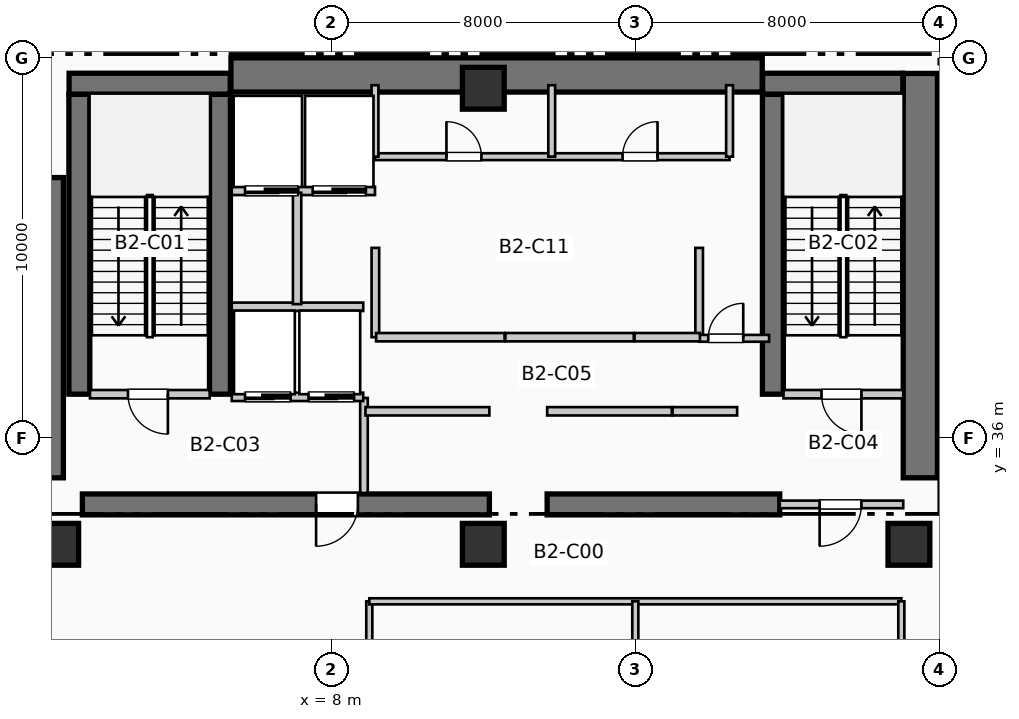
"""IFC4 building model, lengths in metres.
Left out: names, types, materials, properties, quantities, classifications, styles, units other than length and angle.
Written with IfcOpenShell. Run it as: python <this file> out.ifc"""

import sys

from ifc_helpers import new_model, si_unit, direction, frame, frame_2d, origin, origin_2d, place, context, subcontext, project, spatial, rectangle, extrude, element, fill, save


model = new_model("IFC4")
c1 = context("Model", 3, precision=1e-05, world=origin(), true_north=direction((0.0, 1.0)))
c2 = subcontext(c1, "Body", "Model", "MODEL_VIEW")
j1 = project(units=[si_unit("LENGTHUNIT", "METRE"), si_unit("PLANEANGLEUNIT", "RADIAN")], contexts=[c1])
p1 = place(None, origin())
s1 = spatial("IfcSite", under=j1, at=p1, CompositionType="ELEMENT")
p2 = place(p1, origin())
s2 = spatial("IfcBuilding", under=s1, at=p2, CompositionType="ELEMENT")
p3 = place(p2, frame((0.0, 0.0, -9.24)))
s3 = spatial("IfcBuildingStorey", under=s2, at=p3, CompositionType="ELEMENT", Elevation=-9.24)
p4 = place(p3, frame((5.36, 45.55, 0.0), z_axis=(0.0, 0.0, 1.0), x_axis=(1.0, 0.0, 0.0)))
e1 = element("IfcWall", 1, at=p4, inside=s3, PredefinedType="SHEAR", context=c2, shape_type="SweptSolid", body=[
    extrude(rectangle(XDim=13.98, YDim=0.9, at=frame_2d((6.99, 0.0))), origin(), (0.0, 0.0, 1.0), 4.62),
])
p5 = place(p3, frame((0.5, 34.95, 0.0), z_axis=(0.0, 0.0, 1.0), x_axis=(0.0, 1.0, 0.0)))
e2 = element("IfcWall", 2, at=p5, inside=s3, PredefinedType="SHEAR", context=c2, shape_type="SweptSolid", body=[
    extrude(rectangle(XDim=7.9, YDim=0.9, at=frame_2d((3.95, 0.0))), origin(), (0.0, 0.0, 1.0), 4.62),
])
p6 = place(p3, frame((23.5, 34.95, 0.0), z_axis=(0.0, 0.0, 1.0), x_axis=(0.0, 1.0, 0.0)))
e3 = element("IfcWall", 3, at=p6, inside=s3, PredefinedType="SHEAR", context=c2, shape_type="SweptSolid", body=[
    extrude(rectangle(XDim=10.64, YDim=0.9, at=frame_2d((5.32, 0.0))), origin(), (0.0, 0.0, 1.0), 4.62),
])
p7 = place(p3, frame((1.45, 34.25, 0.0), z_axis=(0.0, 0.0, 1.0), x_axis=(1.0, 0.0, 0.0)))
e4 = element("IfcWall", 4, at=p7, inside=s3, PredefinedType="SHEAR", context=c2, shape_type="SweptSolid", body=[
    extrude(rectangle(XDim=10.71, YDim=0.55, at=frame_2d((5.355, 0.0))), origin(), (0.0, 0.0, 1.0), 4.62),
])
p8 = place(p7, frame((7.25, 0.0, 0.0), z_axis=(0.0, 0.0, 1.0), x_axis=(-1.0, 0.0, 0.0)))
e5 = element("IfcOpeningElement", 5, at=p8, cuts=e4, PredefinedType="OPENING", context=c2, shape_type="SweptSolid", body=[
    extrude(rectangle(XDim=1.1, YDim=2.15, at=frame_2d((0.55, 1.075))), frame((0.0, 0.285, 0.0), z_axis=(0.0, -1.0, 0.0), x_axis=(1.0, 0.0, 0.0)), (0.0, 0.0, 1.0), 0.57),
])
p9 = place(p3, frame((13.68, 34.25, 0.0), z_axis=(0.0, 0.0, 1.0), x_axis=(1.0, 0.0, 0.0)))
e6 = element("IfcWall", 6, at=p9, inside=s3, PredefinedType="SHEAR", context=c2, shape_type="SweptSolid", body=[
    extrude(rectangle(XDim=6.12, YDim=0.55, at=frame_2d((3.06, 0.0))), origin(), (0.0, 0.0, 1.0), 4.62),
])
for number, where, z_axis, x_axis in (
    (7, (1.37, 37.15, 0.0), (0.0, 0.0, 1.0), (0.0, 1.0, 0.0)),
    (8, (5.07, 37.15, 0.0), (0.0, 0.0, 1.0), (0.0, 1.0, 0.0)),
):
    element("IfcWall", number, at=place(p3, frame(where, z_axis=z_axis, x_axis=x_axis)), inside=s3, PredefinedType="SHEAR", context=c2, shape_type="SweptSolid", body=[
        extrude(rectangle(XDim=7.89, YDim=0.55, at=frame_2d((3.945, 0.0))), origin(), (0.0, 0.0, 1.0), 4.62),
    ])
p10 = place(p3, frame((1.1, 45.32, 0.0), z_axis=(0.0, 0.0, 1.0), x_axis=(1.0, 0.0, 0.0)))
e9 = element("IfcWall", 9, at=p10, inside=s3, PredefinedType="SHEAR", context=c2, shape_type="SweptSolid", body=[
    extrude(rectangle(XDim=4.24, YDim=0.55, at=frame_2d((2.12, 0.0))), origin(), (0.0, 0.0, 1.0), 4.62),
])
p11 = place(p3, frame((19.62, 37.15, 0.0), z_axis=(0.0, 0.0, 1.0), x_axis=(0.0, 1.0, 0.0)))
e10 = element("IfcWall", 10, at=p11, inside=s3, PredefinedType="SHEAR", context=c2, shape_type="SweptSolid", body=[
    extrude(rectangle(XDim=7.89, YDim=0.55, at=frame_2d((3.945, 0.0))), origin(), (0.0, 0.0, 1.0), 4.62),
])
p12 = place(p3, frame((19.35, 45.32, 0.0), z_axis=(0.0, 0.0, 1.0), x_axis=(1.0, 0.0, 0.0)))
e11 = element("IfcWall", 11, at=p12, inside=s3, PredefinedType="SHEAR", context=c2, shape_type="SweptSolid", body=[
    extrude(rectangle(XDim=3.69, YDim=0.55, at=frame_2d((1.845, 0.0))), origin(), (0.0, 0.0, 1.0), 4.62),
])
for number, where, z_axis, x_axis in (
    (12, (0.8, 33.2, 0.0), (0.0, 0.0, 1.0), (1.0, 0.0, 0.0)),
    (13, (12.0, 33.2, 0.0), (0.0, 0.0, 1.0), (1.0, 0.0, 0.0)),
    (14, (12.0, 45.2, 0.0), (0.0, 0.0, 1.0), (1.0, 0.0, 0.0)),
    (15, (23.2, 33.2, 0.0), (0.0, 0.0, 1.0), (1.0, 0.0, 0.0)),
):
    element("IfcColumn", number, at=place(p3, frame(where, z_axis=z_axis, x_axis=x_axis)), inside=s3, PredefinedType="COLUMN", context=c2, shape_type="SweptSolid", body=[
        extrude(rectangle(XDim=1.1, YDim=1.1, at=origin_2d()), origin(), (0.0, 0.0, 1.0), 4.62),
    ])
p13 = place(p3, frame((1.65, 37.15, 0.0), z_axis=(0.0, 0.0, 1.0), x_axis=(1.0, 0.0, 0.0)))
e16 = element("IfcWall", 16, at=p13, inside=s3, PredefinedType="PARTITIONING", context=c2, shape_type="SweptSolid", body=[
    extrude(rectangle(XDim=3.15, YDim=0.22, at=frame_2d((1.575, 0.0))), origin(), (0.0, 0.0, 1.0), 4.27),
])
p14 = place(p13, frame((2.05, 0.0, 0.0), z_axis=(0.0, 0.0, 1.0), x_axis=(-1.0, 0.0, 0.0)))
e17 = element("IfcOpeningElement", 17, at=p14, cuts=e16, PredefinedType="OPENING", context=c2, shape_type="SweptSolid", body=[
    extrude(rectangle(XDim=1.05, YDim=2.15, at=frame_2d((0.525, 1.075))), frame((0.0, 0.12, 0.0), z_axis=(0.0, -1.0, 0.0), x_axis=(1.0, 0.0, 0.0)), (0.0, 0.0, 1.0), 0.24),
])
p15 = place(p3, frame((8.86, 34.55, 0.0), z_axis=(0.0, 0.0, 1.0), x_axis=(0.0, 1.0, 0.0)))
e18 = element("IfcWall", 18, at=p15, inside=s3, PredefinedType="PARTITIONING", context=c2, shape_type="SweptSolid", body=[
    extrude(rectangle(XDim=2.5, YDim=0.2, at=frame_2d((1.25, 0.0))), origin(), (0.0, 0.0, 1.0), 4.27),
])
p16 = place(p3, frame((19.9, 37.15, 0.0), z_axis=(0.0, 0.0, 1.0), x_axis=(1.0, 0.0, 0.0)))
e19 = element("IfcWall", 19, at=p16, inside=s3, PredefinedType="PARTITIONING", context=c2, shape_type="SweptSolid", body=[
    extrude(rectangle(XDim=3.15, YDim=0.22, at=frame_2d((1.575, 0.0))), origin(), (0.0, 0.0, 1.0), 4.27),
])
p17 = place(p16, frame((2.05, 0.0, 0.0), z_axis=(0.0, 0.0, 1.0), x_axis=(-1.0, 0.0, 0.0)))
e20 = element("IfcOpeningElement", 20, at=p17, cuts=e19, PredefinedType="OPENING", context=c2, shape_type="SweptSolid", body=[
    extrude(rectangle(XDim=1.05, YDim=2.15, at=frame_2d((0.525, 1.075))), frame((0.0, 0.12, 0.0), z_axis=(0.0, -1.0, 0.0), x_axis=(1.0, 0.0, 0.0)), (0.0, 0.0, 1.0), 0.24),
])
p18 = place(p3, frame((19.8, 34.25, 0.0), z_axis=(0.0, 0.0, 1.0), x_axis=(1.0, 0.0, 0.0)))
e21 = element("IfcWall", 21, at=p18, inside=s3, PredefinedType="PARTITIONING", context=c2, shape_type="SweptSolid", body=[
    extrude(rectangle(XDim=3.25, YDim=0.2, at=frame_2d((1.625, 0.0))), origin(), (0.0, 0.0, 1.0), 4.27),
])
p19 = place(p18, frame((2.15, 0.0, 0.0), z_axis=(0.0, 0.0, 1.0), x_axis=(-1.0, 0.0, 0.0)))
e22 = element("IfcOpeningElement", 22, at=p19, cuts=e21, PredefinedType="OPENING", context=c2, shape_type="SweptSolid", body=[
    extrude(rectangle(XDim=1.1, YDim=2.15, at=frame_2d((0.55, 1.075))), frame((0.0, 0.11, 0.0), z_axis=(0.0, -1.0, 0.0), x_axis=(1.0, 0.0, 0.0)), (0.0, 0.0, 1.0), 0.22),
])
p20 = place(p3, frame((5.38, 37.08, 0.0), z_axis=(0.0, 0.0, 1.0), x_axis=(1.0, 0.0, 0.0)))
e23 = element("IfcWall", 23, at=p20, inside=s3, PredefinedType="PARTITIONING", context=c2, shape_type="SweptSolid", body=[
    extrude(rectangle(XDim=3.46, YDim=0.22, at=frame_2d((1.73, 0.0))), origin(), (0.0, 0.0, 1.0), 4.27),
])
p21 = place(p20, frame((1.55, 0.0, 0.0), z_axis=(0.0, 0.0, 1.0), x_axis=(-1.0, 0.0, 0.0)))
e24 = element("IfcOpeningElement", 24, at=p21, cuts=e23, PredefinedType="OPENING", context=c2, shape_type="SweptSolid", body=[
    extrude(rectangle(XDim=1.2, YDim=2.2, at=frame_2d((0.6, 1.1))), frame((0.0, 0.12, 0.0), z_axis=(0.0, -1.0, 0.0), x_axis=(1.0, 0.0, 0.0)), (0.0, 0.0, 1.0), 0.24),
])
p22 = place(p20, frame((3.22, 0.0, 0.0), z_axis=(0.0, 0.0, 1.0), x_axis=(-1.0, 0.0, 0.0)))
e25 = element("IfcOpeningElement", 25, at=p22, cuts=e23, PredefinedType="OPENING", context=c2, shape_type="SweptSolid", body=[
    extrude(rectangle(XDim=1.2, YDim=2.2, at=frame_2d((0.6, 1.1))), frame((0.0, 0.12, 0.0), z_axis=(0.0, -1.0, 0.0), x_axis=(1.0, 0.0, 0.0)), (0.0, 0.0, 1.0), 0.24),
])
p23 = place(p3, frame((5.38, 39.45, 0.0), z_axis=(0.0, 0.0, 1.0), x_axis=(1.0, 0.0, 0.0)))
e26 = element("IfcWall", 26, at=p23, inside=s3, PredefinedType="PARTITIONING", context=c2, shape_type="SweptSolid", body=[
    extrude(rectangle(XDim=3.46, YDim=0.22, at=frame_2d((1.73, 0.0))), origin(), (0.0, 0.0, 1.0), 4.27),
])
p24 = place(p3, frame((5.38, 42.5, 0.0), z_axis=(0.0, 0.0, 1.0), x_axis=(1.0, 0.0, 0.0)))
e27 = element("IfcWall", 27, at=p24, inside=s3, PredefinedType="PARTITIONING", context=c2, shape_type="SweptSolid", body=[
    extrude(rectangle(XDim=3.77, YDim=0.22, at=frame_2d((1.885, 0.0))), origin(), (0.0, 0.0, 1.0), 4.27),
])
p25 = place(p24, frame((1.75, 0.0, 0.0), z_axis=(0.0, 0.0, 1.0), x_axis=(-1.0, 0.0, 0.0)))
e28 = element("IfcOpeningElement", 28, at=p25, cuts=e27, PredefinedType="OPENING", context=c2, shape_type="SweptSolid", body=[
    extrude(rectangle(XDim=1.4, YDim=2.2, at=frame_2d((0.7, 1.1))), frame((0.0, 0.12, 0.0), z_axis=(0.0, -1.0, 0.0), x_axis=(1.0, 0.0, 0.0)), (0.0, 0.0, 1.0), 0.24),
])
p26 = place(p24, frame((3.53, 0.0, 0.0), z_axis=(0.0, 0.0, 1.0), x_axis=(-1.0, 0.0, 0.0)))
e29 = element("IfcOpeningElement", 29, at=p26, cuts=e27, PredefinedType="OPENING", context=c2, shape_type="SweptSolid", body=[
    extrude(rectangle(XDim=1.4, YDim=2.2, at=frame_2d((0.7, 1.1))), frame((0.0, 0.12, 0.0), z_axis=(0.0, -1.0, 0.0), x_axis=(1.0, 0.0, 0.0)), (0.0, 0.0, 1.0), 0.24),
])
p27 = place(p3, frame((7.1, 39.52, 0.0), z_axis=(0.0, 0.0, 1.0), x_axis=(0.0, 1.0, 0.0)))
e30 = element("IfcWall", 30, at=p27, inside=s3, PredefinedType="PARTITIONING", context=c2, shape_type="SweptSolid", body=[
    extrude(rectangle(XDim=2.93, YDim=0.22, at=frame_2d((1.465, 0.0))), origin(), (0.0, 0.0, 1.0), 4.27),
])
for number, where, z_axis, x_axis in (
    (31, (9.16, 38.65, 0.0), (0.0, 0.0, 1.0), (0.0, 1.0, 0.0)),
    (32, (17.68, 38.65, 0.0), (0.0, 0.0, 1.0), (0.0, 1.0, 0.0)),
):
    element("IfcWall", number, at=place(p3, frame(where, z_axis=z_axis, x_axis=x_axis)), inside=s3, PredefinedType="PARTITIONING", context=c2, shape_type="SweptSolid", body=[
        extrude(rectangle(XDim=2.35, YDim=0.2, at=frame_2d((1.175, 0.0))), origin(), (0.0, 0.0, 1.0), 4.27),
    ])
p28 = place(p3, frame((17.68, 38.62, 0.0), z_axis=(0.0, 0.0, 1.0), x_axis=(1.0, 0.0, 0.0)))
e33 = element("IfcWall", 33, at=p28, inside=s3, PredefinedType="PARTITIONING", context=c2, shape_type="SweptSolid", body=[
    extrude(rectangle(XDim=1.84, YDim=0.18, at=frame_2d((0.92, 0.0))), origin(), (0.0, 0.0, 1.0), 4.27),
])
p29 = place(p28, frame((0.24, 0.0, 0.0)))
e34 = element("IfcOpeningElement", 34, at=p29, cuts=e33, PredefinedType="OPENING", context=c2, shape_type="SweptSolid", body=[
    extrude(rectangle(XDim=0.92, YDim=2.1, at=frame_2d((0.46, 1.05))), frame((0.0, 0.1, 0.0), z_axis=(0.0, -1.0, 0.0), x_axis=(1.0, 0.0, 0.0)), (0.0, 0.0, 1.0), 0.2),
])
p30 = place(p3, frame((8.9, 36.7, 0.0), z_axis=(0.0, 0.0, 1.0), x_axis=(1.0, 0.0, 0.0)))
e35 = element("IfcWall", 35, at=p30, inside=s3, PredefinedType="PARTITIONING", context=c2, shape_type="SweptSolid", body=[
    extrude(rectangle(XDim=3.26, YDim=0.22, at=frame_2d((1.63, 0.0))), origin(), (0.0, 0.0, 1.0), 4.27),
])
p31 = place(p3, frame((9.18, 38.65, 0.0), z_axis=(0.0, 0.0, 1.0), x_axis=(1.0, 0.0, 0.0)))
e36 = element("IfcWall", 36, at=p31, inside=s3, PredefinedType="PARTITIONING", context=c2, shape_type="SweptSolid", body=[
    extrude(rectangle(XDim=3.38, YDim=0.22, at=frame_2d((1.69, 0.0))), origin(), (0.0, 0.0, 1.0), 4.27),
])
p32 = place(p3, frame((13.68, 36.7, 0.0), z_axis=(0.0, 0.0, 1.0), x_axis=(1.0, 0.0, 0.0)))
e37 = element("IfcWall", 37, at=p32, inside=s3, PredefinedType="PARTITIONING", context=c2, shape_type="SweptSolid", body=[
    extrude(rectangle(XDim=3.28, YDim=0.22, at=frame_2d((1.64, 0.0))), origin(), (0.0, 0.0, 1.0), 4.27),
])
p33 = place(p3, frame((12.58, 38.65, 0.0), z_axis=(0.0, 0.0, 1.0), x_axis=(1.0, 0.0, 0.0)))
e38 = element("IfcWall", 38, at=p33, inside=s3, PredefinedType="PARTITIONING", context=c2, shape_type="SweptSolid", body=[
    extrude(rectangle(XDim=3.38, YDim=0.22, at=frame_2d((1.69, 0.0))), origin(), (0.0, 0.0, 1.0), 4.27),
])
p34 = place(p3, frame((16.98, 36.7, 0.0), z_axis=(0.0, 0.0, 1.0), x_axis=(1.0, 0.0, 0.0)))
e39 = element("IfcWall", 39, at=p34, inside=s3, PredefinedType="PARTITIONING", context=c2, shape_type="SweptSolid", body=[
    extrude(rectangle(XDim=1.7, YDim=0.22, at=frame_2d((0.85, 0.0))), origin(), (0.0, 0.0, 1.0), 4.27),
])
p35 = place(p3, frame((15.98, 38.65, 0.0), z_axis=(0.0, 0.0, 1.0), x_axis=(1.0, 0.0, 0.0)))
e40 = element("IfcWall", 40, at=p35, inside=s3, PredefinedType="PARTITIONING", context=c2, shape_type="SweptSolid", body=[
    extrude(rectangle(XDim=1.72, YDim=0.22, at=frame_2d((0.86, 0.0))), origin(), (0.0, 0.0, 1.0), 4.27),
])
p36 = place(p3, frame((9.15, 43.4, 0.0), z_axis=(0.0, 0.0, 1.0), x_axis=(1.0, 0.0, 0.0)))
e41 = element("IfcWall", 41, at=p36, inside=s3, PredefinedType="PLUMBINGWALL", context=c2, shape_type="SweptSolid", body=[
    extrude(rectangle(XDim=9.33, YDim=0.18, at=frame_2d((4.665, 0.0))), origin(), (0.0, 0.0, 1.0), 4.27),
])
p37 = place(p36, frame((1.88, 0.0, 0.0)))
e42 = element("IfcOpeningElement", 42, at=p37, cuts=e41, PredefinedType="OPENING", context=c2, shape_type="SweptSolid", body=[
    extrude(rectangle(XDim=0.92, YDim=2.1, at=frame_2d((0.46, 1.05))), frame((0.0, 0.1, 0.0), z_axis=(0.0, -1.0, 0.0), x_axis=(1.0, 0.0, 0.0)), (0.0, 0.0, 1.0), 0.2),
])
p38 = place(p36, frame((6.515, 0.0, 0.0)))
e43 = element("IfcOpeningElement", 43, at=p38, cuts=e41, PredefinedType="OPENING", context=c2, shape_type="SweptSolid", body=[
    extrude(rectangle(XDim=0.92, YDim=2.1, at=frame_2d((0.46, 1.05))), frame((0.0, 0.1, 0.0), z_axis=(0.0, -1.0, 0.0), x_axis=(1.0, 0.0, 0.0)), (0.0, 0.0, 1.0), 0.2),
])
for number, where, z_axis, x_axis in (
    (44, (9.15, 43.4, 0.0), (0.0, 0.0, 1.0), (0.0, 1.0, 0.0)),
    (45, (18.48, 43.4, 0.0), (0.0, 0.0, 1.0), (0.0, 1.0, 0.0)),
    (46, (13.8, 43.4, 0.0), (0.0, 0.0, 1.0), (0.0, 1.0, 0.0)),
):
    element("IfcWall", number, at=place(p3, frame(where, z_axis=z_axis, x_axis=x_axis)), inside=s3, PredefinedType="PLUMBINGWALL", context=c2, shape_type="SweptSolid", body=[
        extrude(rectangle(XDim=1.88, YDim=0.18, at=frame_2d((0.94, 0.0))), origin(), (0.0, 0.0, 1.0), 4.27),
    ])
p39 = place(p3, frame((9.0, 26.2, 0.0), z_axis=(0.0, 0.0, 1.0), x_axis=(0.0, 1.0, 0.0)))
e47 = element("IfcWall", 47, at=p39, inside=s3, PredefinedType="PARTITIONING", context=c2, shape_type="SweptSolid", body=[
    extrude(rectangle(XDim=5.5, YDim=0.16, at=frame_2d((2.75, 0.0))), origin(), (0.0, 0.0, 1.0), 4.27),
])
p40 = place(p3, frame((9.0, 31.7, 0.0), z_axis=(0.0, 0.0, 1.0), x_axis=(1.0, 0.0, 0.0)))
e48 = element("IfcWall", 48, at=p40, inside=s3, PredefinedType="PARTITIONING", context=c2, shape_type="SweptSolid", body=[
    extrude(rectangle(XDim=14.0, YDim=0.16, at=frame_2d((7.0, 0.0))), origin(), (0.0, 0.0, 1.0), 4.27),
])
p41 = place(p3, frame((23.0, 26.2, 0.0), z_axis=(0.0, 0.0, 1.0), x_axis=(0.0, 1.0, 0.0)))
e49 = element("IfcWall", 49, at=p41, inside=s3, PredefinedType="PARTITIONING", context=c2, shape_type="SweptSolid", body=[
    extrude(rectangle(XDim=5.5, YDim=0.16, at=frame_2d((2.75, 0.0))), origin(), (0.0, 0.0, 1.0), 3.455),
])
p42 = place(p3, frame((16.0, 26.2, 0.0), z_axis=(0.0, 0.0, 1.0), x_axis=(0.0, 1.0, 0.0)))
e50 = element("IfcWall", 50, at=p42, inside=s3, PredefinedType="PARTITIONING", context=c2, shape_type="SweptSolid", body=[
    extrude(rectangle(XDim=5.5, YDim=0.16, at=frame_2d((2.75, 0.0))), origin(), (0.0, 0.0, 1.0), 4.27),
])
p43 = place(p14, origin())
e51 = element("IfcDoor", 51, at=p43, inside=s3, OperationType="SINGLE_SWING_RIGHT", PredefinedType="DOOR", context=c2, shape_type="SweptSolid", body=[
    extrude(rectangle(XDim=1.05, YDim=2.15, at=frame_2d((0.525, 1.075))), frame((0.0, 0.025, 0.0), z_axis=(0.0, -1.0, 0.0), x_axis=(1.0, 0.0, 0.0)), (0.0, 0.0, 1.0), 0.05),
])
fill(e17, e51)
p44 = place(p8, origin())
e52 = element("IfcDoor", 52, at=p44, inside=s3, OperationType="SINGLE_SWING_LEFT", PredefinedType="DOOR", context=c2, shape_type="SweptSolid", body=[
    extrude(rectangle(XDim=1.1, YDim=2.15, at=frame_2d((0.55, 1.075))), frame((0.0, 0.025, 0.0), z_axis=(0.0, -1.0, 0.0), x_axis=(1.0, 0.0, 0.0)), (0.0, 0.0, 1.0), 0.05),
])
fill(e5, e52)
p45 = place(p17, origin())
e53 = element("IfcDoor", 53, at=p45, inside=s3, OperationType="SINGLE_SWING_RIGHT", PredefinedType="DOOR", context=c2, shape_type="SweptSolid", body=[
    extrude(rectangle(XDim=1.05, YDim=2.15, at=frame_2d((0.525, 1.075))), frame((0.0, 0.025, 0.0), z_axis=(0.0, -1.0, 0.0), x_axis=(1.0, 0.0, 0.0)), (0.0, 0.0, 1.0), 0.05),
])
fill(e20, e53)
p46 = place(p19, origin())
e54 = element("IfcDoor", 54, at=p46, inside=s3, OperationType="SINGLE_SWING_LEFT", PredefinedType="DOOR", context=c2, shape_type="SweptSolid", body=[
    extrude(rectangle(XDim=1.1, YDim=2.15, at=frame_2d((0.55, 1.075))), frame((0.0, 0.025, 0.0), z_axis=(0.0, -1.0, 0.0), x_axis=(1.0, 0.0, 0.0)), (0.0, 0.0, 1.0), 0.05),
])
fill(e22, e54)
p47 = place(p21, origin())
e55 = element("IfcDoor", 55, at=p47, inside=s3, OperationType="SLIDING_TO_RIGHT", PredefinedType="DOOR", context=c2, shape_type="SweptSolid", body=[
    extrude(rectangle(XDim=1.2, YDim=2.2, at=frame_2d((0.6, 1.1))), frame((0.0, 0.025, 0.0), z_axis=(0.0, -1.0, 0.0), x_axis=(1.0, 0.0, 0.0)), (0.0, 0.0, 1.0), 0.05),
])
fill(e24, e55)
p48 = place(p22, origin())
e56 = element("IfcDoor", 56, at=p48, inside=s3, OperationType="SLIDING_TO_RIGHT", PredefinedType="DOOR", context=c2, shape_type="SweptSolid", body=[
    extrude(rectangle(XDim=1.2, YDim=2.2, at=frame_2d((0.6, 1.1))), frame((0.0, 0.025, 0.0), z_axis=(0.0, -1.0, 0.0), x_axis=(1.0, 0.0, 0.0)), (0.0, 0.0, 1.0), 0.05),
])
fill(e25, e56)
p49 = place(p25, origin())
e57 = element("IfcDoor", 57, at=p49, inside=s3, OperationType="SLIDING_TO_LEFT", PredefinedType="DOOR", context=c2, shape_type="SweptSolid", body=[
    extrude(rectangle(XDim=1.4, YDim=2.2, at=frame_2d((0.7, 1.1))), frame((0.0, 0.025, 0.0), z_axis=(0.0, -1.0, 0.0), x_axis=(1.0, 0.0, 0.0)), (0.0, 0.0, 1.0), 0.05),
])
fill(e28, e57)
p50 = place(p26, origin())
e58 = element("IfcDoor", 58, at=p50, inside=s3, OperationType="SLIDING_TO_LEFT", PredefinedType="DOOR", context=c2, shape_type="SweptSolid", body=[
    extrude(rectangle(XDim=1.4, YDim=2.2, at=frame_2d((0.7, 1.1))), frame((0.0, 0.025, 0.0), z_axis=(0.0, -1.0, 0.0), x_axis=(1.0, 0.0, 0.0)), (0.0, 0.0, 1.0), 0.05),
])
fill(e29, e58)
p51 = place(p29, origin())
e59 = element("IfcDoor", 59, at=p51, inside=s3, OperationType="SINGLE_SWING_RIGHT", PredefinedType="DOOR", context=c2, shape_type="SweptSolid", body=[
    extrude(rectangle(XDim=0.92, YDim=2.1, at=frame_2d((0.46, 1.05))), frame((0.0, 0.025, 0.0), z_axis=(0.0, -1.0, 0.0), x_axis=(1.0, 0.0, 0.0)), (0.0, 0.0, 1.0), 0.05),
])
fill(e34, e59)
p52 = place(p37, origin())
e60 = element("IfcDoor", 60, at=p52, inside=s3, OperationType="SINGLE_SWING_LEFT", PredefinedType="DOOR", context=c2, shape_type="SweptSolid", body=[
    extrude(rectangle(XDim=0.92, YDim=2.1, at=frame_2d((0.46, 1.05))), frame((0.0, 0.025, 0.0), z_axis=(0.0, -1.0, 0.0), x_axis=(1.0, 0.0, 0.0)), (0.0, 0.0, 1.0), 0.05),
])
fill(e42, e60)
p53 = place(p38, origin())
e61 = element("IfcDoor", 61, at=p53, inside=s3, OperationType="SINGLE_SWING_RIGHT", PredefinedType="DOOR", context=c2, shape_type="SweptSolid", body=[
    extrude(rectangle(XDim=0.92, YDim=2.1, at=frame_2d((0.46, 1.05))), frame((0.0, 0.025, 0.0), z_axis=(0.0, -1.0, 0.0), x_axis=(1.0, 0.0, 0.0)), (0.0, 0.0, 1.0), 0.05),
])
fill(e43, e61)
save(model, sys.argv[1])
